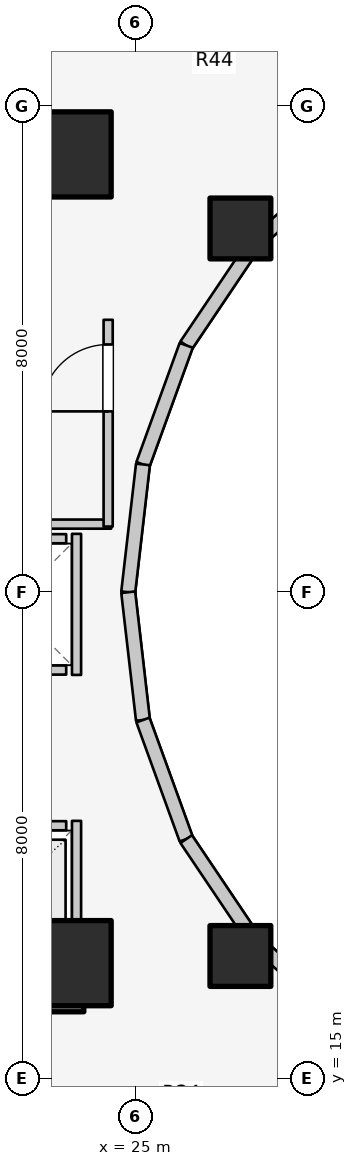
"""IFC4 building model, lengths in metres.
Left out: names, types, materials, properties, quantities, classifications, styles, units other than length and angle.
Written with IfcOpenShell. Run it as: python <this file> out.ifc"""

import sys

from ifc_helpers import new_model, si_unit, direction, frame, frame_2d, origin, origin_2d, place, context, subcontext, project, spatial, rectangle, extrude, element, fill, save


model = new_model("IFC4")
c1 = context("Model", 3, precision=1e-05, world=origin(), true_north=direction((0.0, 1.0)))
c2 = subcontext(c1, "Body", "Model", "MODEL_VIEW")
j1 = project(units=[si_unit("LENGTHUNIT", "METRE"), si_unit("PLANEANGLEUNIT", "RADIAN")], contexts=[c1])
p1 = place(None, origin())
s1 = spatial("IfcSite", under=j1, at=p1, CompositionType="ELEMENT")
p2 = place(p1, origin())
s2 = spatial("IfcBuilding", under=s1, at=p2, CompositionType="ELEMENT")
p3 = place(p2, frame((0.0, 0.0, 52.4)))
s3 = spatial("IfcBuildingStorey", under=s2, at=p3, CompositionType="ELEMENT", Elevation=52.4)
for number, where, z_axis, x_axis in (
    (1, (19.65, 16.55, 0.0), (0.0, 0.0, 1.0), (1.0, 0.0, 0.0)),
    (2, (19.65, 30.35, 0.0), (0.0, 0.0, 1.0), (1.0, 0.0, 0.0)),
):
    element("IfcWall", number, at=place(p3, frame(where, z_axis=z_axis, x_axis=x_axis)), inside=s3, PredefinedType="SHEAR", context=c2, shape_type="SweptSolid", body=[
        extrude(rectangle(XDim=4.5, YDim=0.9, at=frame_2d((2.25, 0.0))), origin(), (0.0, 0.0, 1.0), 3.1),
    ])
for number, where, z_axis, x_axis in (
    (3, (23.9, 16.9, 0.0), (0.0, 0.0, 1.0), (1.0, 0.0, 0.0)),
    (4, (23.9, 30.2, 0.0), (0.0, 0.0, 1.0), (1.0, 0.0, 0.0)),
):
    element("IfcColumn", number, at=place(p3, frame(where, z_axis=z_axis, x_axis=x_axis)), inside=s3, PredefinedType="COLUMN", context=c2, shape_type="SweptSolid", body=[
        extrude(rectangle(XDim=1.4, YDim=1.4, at=origin_2d()), origin(), (0.0, 0.0, 1.0), 3.1),
    ])
for number, where, z_axis, x_axis in (
    (5, (26.725, 28.982, 0.0), (0.0, 0.0, 1.0), (1.0, 0.0, 0.0)),
    (6, (26.725, 17.018, 0.0), (0.0, 0.0, 1.0), (1.0, 0.0, 0.0)),
):
    element("IfcColumn", number, at=place(p3, frame(where, z_axis=z_axis, x_axis=x_axis)), inside=s3, PredefinedType="COLUMN", context=c2, shape_type="SweptSolid", body=[
        extrude(rectangle(XDim=1.0, YDim=1.0, at=origin_2d()), origin(), (0.0, 0.0, 1.0), 3.1),
    ])
p4 = place(p3, frame((28.44, 30.032, 0.0), z_axis=(0.0, 0.0, 1.0), x_axis=(-0.752576694707, -0.658504607869, 0.0)))
e7 = element("IfcWall", 7, at=p4, inside=s3, PredefinedType="STANDARD", context=c2, shape_type="SweptSolid", body=[
    extrude(rectangle(XDim=1.959, YDim=0.23, at=frame_2d((0.98, 0.0))), origin(), (0.0, 0.0, 1.0), 1.22),
])
p5 = place(p3, frame((26.965, 28.742, 0.0), z_axis=(0.0, 0.0, 1.0), x_axis=(-0.558197800898, -0.829707909492, 0.0)))
e8 = element("IfcWall", 8, at=p5, inside=s3, PredefinedType="STANDARD", context=c2, shape_type="SweptSolid", body=[
    extrude(rectangle(XDim=2.027, YDim=0.23, at=frame_2d((1.013, 0.0))), origin(), (0.0, 0.0, 1.0), 1.22),
])
p6 = place(p3, frame((25.834, 27.06, 0.0), z_axis=(0.0, 0.0, 1.0), x_axis=(-0.341423187295, -0.93990968033, 0.0)))
e9 = element("IfcWall", 9, at=p6, inside=s3, PredefinedType="STANDARD", context=c2, shape_type="SweptSolid", body=[
    extrude(rectangle(XDim=2.084, YDim=0.23, at=frame_2d((1.042, 0.0))), origin(), (0.0, 0.0, 1.0), 2.56),
])
for number, where, z_axis, x_axis in (
    (10, (25.123, 25.102, 0.0), (0.0, 0.0, 1.0), (-0.115, -0.993, 0.0)),
    (11, (24.88, 23.0, 0.0), (0.0, 0.0, 1.0), (0.115, -0.993, 0.0)),
):
    element("IfcWall", number, at=place(p3, frame(where, z_axis=z_axis, x_axis=x_axis)), inside=s3, PredefinedType="STANDARD", context=c2, shape_type="SweptSolid", body=[
        extrude(rectangle(XDim=2.115, YDim=0.23, at=frame_2d((1.058, 0.0))), origin(), (0.0, 0.0, 1.0), 2.56),
    ])
p7 = place(p3, frame((25.123, 20.898, 0.0), z_axis=(0.0, 0.0, 1.0), x_axis=(0.341423187295, -0.93990968033, 0.0)))
e12 = element("IfcWall", 12, at=p7, inside=s3, PredefinedType="STANDARD", context=c2, shape_type="SweptSolid", body=[
    extrude(rectangle(XDim=2.084, YDim=0.23, at=frame_2d((1.042, 0.0))), origin(), (0.0, 0.0, 1.0), 2.56),
])
p8 = place(p3, frame((25.834, 18.94, 0.0), z_axis=(0.0, 0.0, 1.0), x_axis=(0.558197800898, -0.829707909492, 0.0)))
e13 = element("IfcWall", 13, at=p8, inside=s3, PredefinedType="STANDARD", context=c2, shape_type="SweptSolid", body=[
    extrude(rectangle(XDim=2.027, YDim=0.23, at=frame_2d((1.013, 0.0))), origin(), (0.0, 0.0, 1.0), 1.22),
])
p9 = place(p3, frame((26.965, 17.258, 0.0), z_axis=(0.0, 0.0, 1.0), x_axis=(0.752576694707, -0.658504607869, 0.0)))
e14 = element("IfcWall", 14, at=p9, inside=s3, PredefinedType="STANDARD", context=c2, shape_type="SweptSolid", body=[
    extrude(rectangle(XDim=1.959, YDim=0.23, at=frame_2d((0.98, 0.0))), origin(), (0.0, 0.0, 1.0), 1.22),
])
p10 = place(p3, frame((22.04, 19.16, 0.0), z_axis=(0.0, 0.0, 1.0), x_axis=(1.0, 0.0, 0.0)))
e15 = element("IfcWall", 15, at=p10, inside=s3, PredefinedType="SOLIDWALL", context=c2, shape_type="SweptSolid", body=[
    extrude(rectangle(XDim=1.82, YDim=0.15, at=frame_2d((0.91, 0.0))), origin(), (0.0, 0.0, 1.0), 2.12),
])
p11 = place(p10, frame((0.36, 0.0, 0.0)))
e16 = element("IfcOpeningElement", 16, at=p11, cuts=e15, PredefinedType="OPENING", context=c2, shape_type="SweptSolid", body=[
    extrude(rectangle(XDim=1.1, YDim=2.1, at=frame_2d((0.55, 1.05))), frame((0.0, 0.085, 0.0), z_axis=(0.0, -1.0, 0.0), x_axis=(1.0, 0.0, 0.0)), (0.0, 0.0, 1.0), 0.17),
])
p12 = place(p3, frame((22.04, 17.1, 0.0), z_axis=(0.0, 0.0, 1.0), x_axis=(1.0, 0.0, 0.0)))
e17 = element("IfcWall", 17, at=p12, inside=s3, PredefinedType="SOLIDWALL", context=c2, shape_type="SweptSolid", body=[
    extrude(rectangle(XDim=1.82, YDim=0.15, at=frame_2d((0.91, 0.0))), origin(), (0.0, 0.0, 1.0), 2.12),
])
p13 = place(p3, frame((24.03, 17.02, 0.0), z_axis=(0.0, 0.0, 1.0), x_axis=(0.0, 1.0, 0.0)))
e18 = element("IfcWall", 18, at=p13, inside=s3, PredefinedType="SOLIDWALL", context=c2, shape_type="SweptSolid", body=[
    extrude(rectangle(XDim=2.22, YDim=0.15, at=frame_2d((1.11, 0.0))), origin(), (0.0, 0.0, 1.0), 1.873),
])
for number, where, z_axis, x_axis in (
    (19, (22.04, 21.72, 0.0), (0.0, 0.0, 1.0), (1.0, 0.0, 0.0)),
    (20, (22.04, 23.88, 0.0), (0.0, 0.0, 1.0), (1.0, 0.0, 0.0)),
):
    element("IfcWall", number, at=place(p3, frame(where, z_axis=z_axis, x_axis=x_axis)), inside=s3, PredefinedType="SOLIDWALL", context=c2, shape_type="SweptSolid", body=[
        extrude(rectangle(XDim=1.82, YDim=0.15, at=frame_2d((0.91, 0.0))), origin(), (0.0, 0.0, 1.0), 2.12),
    ])
p14 = place(p3, frame((24.03, 21.64, 0.0), z_axis=(0.0, 0.0, 1.0), x_axis=(0.0, 1.0, 0.0)))
e21 = element("IfcWall", 21, at=p14, inside=s3, PredefinedType="SOLIDWALL", context=c2, shape_type="SweptSolid", body=[
    extrude(rectangle(XDim=2.32, YDim=0.15, at=frame_2d((1.16, 0.0))), origin(), (0.0, 0.0, 1.0), 2.12),
])
p15 = place(p3, frame((19.52, 24.12, 0.0), z_axis=(0.0, 0.0, 1.0), x_axis=(1.0, 0.0, 0.0)))
e22 = element("IfcWall", 22, at=p15, inside=s3, PredefinedType="PARTITIONING", context=c2, shape_type="SweptSolid", body=[
    extrude(rectangle(XDim=5.08, YDim=0.15, at=frame_2d((2.54, 0.0))), origin(), (0.0, 0.0, 1.0), 2.12),
])
p16 = place(p3, frame((24.55, 24.08, 0.0), z_axis=(0.0, 0.0, 1.0), x_axis=(0.0, 1.0, 0.0)))
e23 = element("IfcWall", 23, at=p16, inside=s3, PredefinedType="PARTITIONING", context=c2, shape_type="SweptSolid", body=[
    extrude(rectangle(XDim=3.4, YDim=0.15, at=frame_2d((1.7, 0.0))), origin(), (0.0, 0.0, 1.0), 2.575),
])
p17 = place(p16, frame((1.894, 0.0, 0.0)))
e24 = element("IfcOpeningElement", 24, at=p17, cuts=e23, PredefinedType="OPENING", context=c2, shape_type="SweptSolid", body=[
    extrude(rectangle(XDim=1.1, YDim=2.1, at=frame_2d((0.55, 1.05))), frame((0.0, 0.085, 0.0), z_axis=(0.0, -1.0, 0.0), x_axis=(1.0, 0.0, 0.0)), (0.0, 0.0, 1.0), 0.17),
])
p18 = place(p17, origin())
e25 = element("IfcDoor", 25, at=p18, inside=s3, OperationType="SINGLE_SWING_LEFT", PredefinedType="DOOR", context=c2, shape_type="SweptSolid", body=[
    extrude(rectangle(XDim=1.1, YDim=2.1, at=frame_2d((0.55, 1.05))), frame((0.0, 0.025, 0.0), z_axis=(0.0, -1.0, 0.0), x_axis=(1.0, 0.0, 0.0)), (0.0, 0.0, 1.0), 0.05),
])
fill(e24, e25)
save(model, sys.argv[1])
